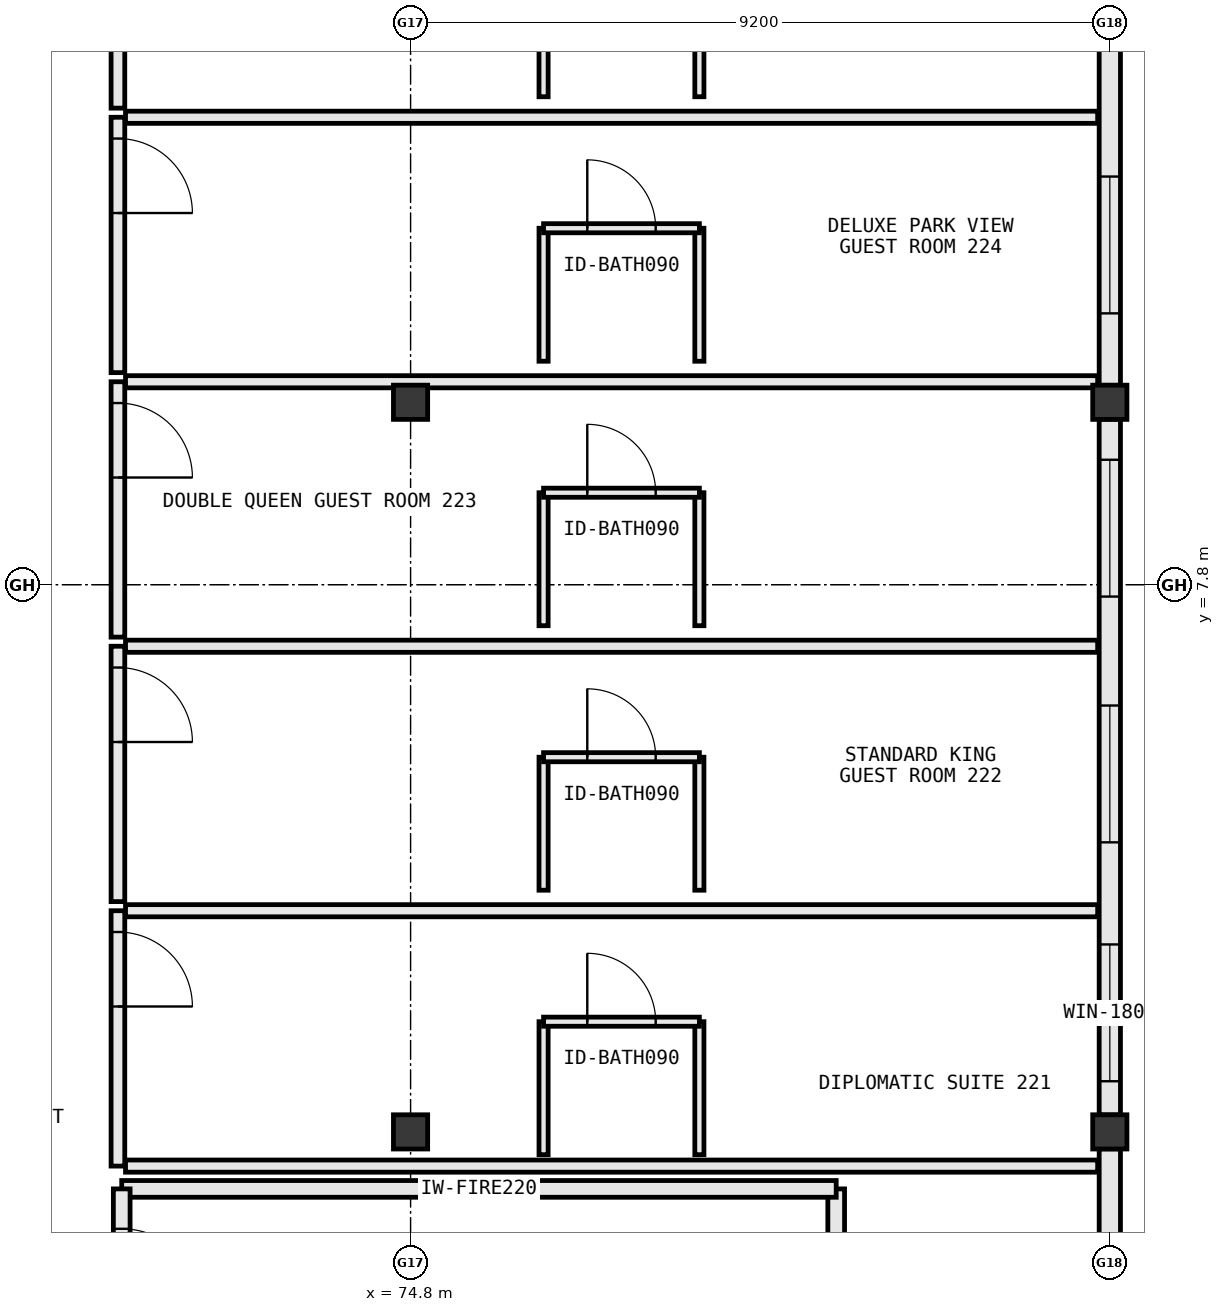
"""IFC4 building model, lengths in metres.
Left out: names, types, materials, properties, quantities, classifications, styles, units other than length and angle.
Written with IfcOpenShell. Run it as: python <this file> out.ifc"""

import sys

from ifc_helpers import new_model, si_unit, direction, frame, frame_2d, origin, origin_2d, place, context, subcontext, project, spatial, rectangle, extrude, element, fill, save


model = new_model("IFC4")
c1 = context("Model", 3, precision=1e-05, world=origin(), true_north=direction((0.0, 1.0)))
c2 = subcontext(c1, "Body", "Model", "MODEL_VIEW")
j1 = project(units=[si_unit("LENGTHUNIT", "METRE"), si_unit("PLANEANGLEUNIT", "RADIAN")], contexts=[c1])
p1 = place(None, origin())
s1 = spatial("IfcSite", under=j1, at=p1, CompositionType="ELEMENT")
p2 = place(p1, origin())
s2 = spatial("IfcBuilding", under=s1, at=p2, CompositionType="ELEMENT")
p3 = place(p2, frame((0.0, 0.0, 31.4)))
s3 = spatial("IfcBuildingStorey", under=s2, at=p3, CompositionType="ELEMENT", Elevation=31.4)
for number, where, z_axis, x_axis in (
    (1, (74.8, 0.6, 0.0), (0.0, 0.0, 1.0), (1.0, 0.0, 0.0)),
    (2, (74.8, 10.2, 0.0), (0.0, 0.0, 1.0), (1.0, 0.0, 0.0)),
    (3, (84.0, 0.6, 0.0), (0.0, 0.0, 1.0), (1.0, 0.0, 0.0)),
    (4, (84.0, 10.2, 0.0), (0.0, 0.0, 1.0), (1.0, 0.0, 0.0)),
):
    element("IfcColumn", number, at=place(p3, frame(where, z_axis=z_axis, x_axis=x_axis)), inside=s3, PredefinedType="COLUMN", context=c2, shape_type="SweptSolid", body=[
        extrude(rectangle(XDim=0.45, YDim=0.45, at=origin_2d()), origin(), (0.0, 0.0, 1.0), 3.8),
    ])
p4 = place(p3, frame((84.0, -8.777, 0.0), z_axis=(0.0, 0.0, 1.0), x_axis=(0.0, 1.0, 0.0)))
e5 = element("IfcWall", 5, at=p4, inside=s3, PredefinedType="STANDARD", context=c2, shape_type="SweptSolid", body=[
    extrude(rectangle(XDim=9.154, YDim=0.28, at=frame_2d((4.577, 0.0))), origin(), (0.0, 0.0, 1.0), 2.97),
])
p5 = place(p4, frame((1.463, 0.0, 0.85)))
e6 = element("IfcOpeningElement", 6, at=p5, cuts=e5, PredefinedType="OPENING", context=c2, shape_type="SweptSolid", body=[
    extrude(rectangle(XDim=1.65, YDim=1.8, at=frame_2d((0.825, 0.9))), frame((0.0, 0.152, 0.0), z_axis=(0.0, -1.0, 0.0), x_axis=(1.0, 0.0, 0.0)), (0.0, 0.0, 1.0), 0.304),
])
p6 = place(p4, frame((6.041, 0.0, 0.85)))
e7 = element("IfcOpeningElement", 7, at=p6, cuts=e5, PredefinedType="OPENING", context=c2, shape_type="SweptSolid", body=[
    extrude(rectangle(XDim=1.65, YDim=1.8, at=frame_2d((0.825, 0.9))), frame((0.0, 0.152, 0.0), z_axis=(0.0, -1.0, 0.0), x_axis=(1.0, 0.0, 0.0)), (0.0, 0.0, 1.0), 0.304),
])
p7 = place(p3, frame((84.0, 0.823, 0.0), z_axis=(0.0, 0.0, 1.0), x_axis=(0.0, 1.0, 0.0)))
e8 = element("IfcWall", 8, at=p7, inside=s3, PredefinedType="STANDARD", context=c2, shape_type="SweptSolid", body=[
    extrude(rectangle(XDim=9.154, YDim=0.28, at=frame_2d((4.577, 0.0))), origin(), (0.0, 0.0, 1.0), 2.97),
])
p8 = place(p7, frame((0.444, 0.0, 0.85)))
e9 = element("IfcOpeningElement", 9, at=p8, cuts=e8, PredefinedType="OPENING", context=c2, shape_type="SweptSolid", body=[
    extrude(rectangle(XDim=1.8, YDim=1.85, at=frame_2d((0.9, 0.925))), frame((0.0, 0.152, 0.0), z_axis=(0.0, -1.0, 0.0), x_axis=(1.0, 0.0, 0.0)), (0.0, 0.0, 1.0), 0.304),
])
p9 = place(p7, frame((3.587, 0.0, 0.85)))
e10 = element("IfcOpeningElement", 10, at=p9, cuts=e8, PredefinedType="OPENING", context=c2, shape_type="SweptSolid", body=[
    extrude(rectangle(XDim=1.8, YDim=1.85, at=frame_2d((0.9, 0.925))), frame((0.0, 0.152, 0.0), z_axis=(0.0, -1.0, 0.0), x_axis=(1.0, 0.0, 0.0)), (0.0, 0.0, 1.0), 0.304),
])
p10 = place(p7, frame((6.821, 0.0, 0.85)))
e11 = element("IfcOpeningElement", 11, at=p10, cuts=e8, PredefinedType="OPENING", context=c2, shape_type="SweptSolid", body=[
    extrude(rectangle(XDim=1.8, YDim=1.85, at=frame_2d((0.9, 0.925))), frame((0.0, 0.152, 0.0), z_axis=(0.0, -1.0, 0.0), x_axis=(1.0, 0.0, 0.0)), (0.0, 0.0, 1.0), 0.304),
])
p11 = place(p3, frame((84.0, 10.423, 0.0), z_axis=(0.0, 0.0, 1.0), x_axis=(0.0, 1.0, 0.0)))
e12 = element("IfcWall", 12, at=p11, inside=s3, PredefinedType="STANDARD", context=c2, shape_type="SweptSolid", body=[
    extrude(rectangle(XDim=7.954, YDim=0.28, at=frame_2d((3.977, 0.0))), origin(), (0.0, 0.0, 1.0), 2.97),
])
p12 = place(p11, frame((0.947, 0.0, 0.85)))
e13 = element("IfcOpeningElement", 13, at=p12, cuts=e12, PredefinedType="OPENING", context=c2, shape_type="SweptSolid", body=[
    extrude(rectangle(XDim=1.8, YDim=1.85, at=frame_2d((0.9, 0.925))), frame((0.0, 0.152, 0.0), z_axis=(0.0, -1.0, 0.0), x_axis=(1.0, 0.0, 0.0)), (0.0, 0.0, 1.0), 0.304),
])
p13 = place(p11, frame((4.427, 0.0, 0.85)))
e14 = element("IfcOpeningElement", 14, at=p13, cuts=e12, PredefinedType="OPENING", context=c2, shape_type="SweptSolid", body=[
    extrude(rectangle(XDim=1.8, YDim=1.85, at=frame_2d((0.9, 0.925))), frame((0.0, 0.152, 0.0), z_axis=(0.0, -1.0, 0.0), x_axis=(1.0, 0.0, 0.0)), (0.0, 0.0, 1.0), 0.304),
])
p14 = place(p3, frame((80.4, -2.25, 0.0), z_axis=(0.0, 0.0, 1.0), x_axis=(0.0, 1.0, 0.0)))
e15 = element("IfcWall", 15, at=p14, inside=s3, PredefinedType="STANDARD", context=c2, shape_type="SweptSolid", body=[
    extrude(rectangle(XDim=2.1, YDim=0.22, at=frame_2d((1.05, 0.0))), origin(), (0.0, 0.0, 1.0), 3.555),
])
p15 = place(p3, frame((80.4, -0.15, 0.0), z_axis=(0.0, 0.0, 1.0), x_axis=(-1.0, 0.0, 0.0)))
e16 = element("IfcWall", 16, at=p15, inside=s3, PredefinedType="STANDARD", context=c2, shape_type="SweptSolid", body=[
    extrude(rectangle(XDim=9.4, YDim=0.22, at=frame_2d((4.7, 0.0))), origin(), (0.0, 0.0, 1.0), 3.555),
])
p16 = place(p3, frame((71.0, -0.15, 0.0), z_axis=(0.0, 0.0, 1.0), x_axis=(0.0, -1.0, 0.0)))
e17 = element("IfcWall", 17, at=p16, inside=s3, PredefinedType="STANDARD", context=c2, shape_type="SweptSolid", body=[
    extrude(rectangle(XDim=2.1, YDim=0.22, at=frame_2d((1.05, 0.0))), origin(), (0.0, 0.0, 1.0), 3.555),
])
p17 = place(p16, frame((0.525, 0.0, 0.0)))
e18 = element("IfcOpeningElement", 18, at=p17, cuts=e17, PredefinedType="OPENING", context=c2, shape_type="SweptSolid", body=[
    extrude(rectangle(XDim=1.05, YDim=2.2, at=frame_2d((0.525, 1.1))), frame((0.0, 0.122, 0.0), z_axis=(0.0, -1.0, 0.0), x_axis=(1.0, 0.0, 0.0)), (0.0, 0.0, 1.0), 0.244),
])
p18 = place(p3, frame((70.95, 3.51, 0.0), z_axis=(0.0, 0.0, 1.0), x_axis=(0.0, -1.0, 0.0)))
e19 = element("IfcWall", 19, at=p18, inside=s3, PredefinedType="PARTITIONING", context=c2, shape_type="SweptSolid", body=[
    extrude(rectangle(XDim=3.36, YDim=0.18, at=frame_2d((1.68, 0.0))), origin(), (0.0, 0.0, 1.0), 3.555),
])
p19 = place(p18, frame((0.28, 0.0, 0.0)))
e20 = element("IfcOpeningElement", 20, at=p19, cuts=e19, PredefinedType="OPENING", context=c2, shape_type="SweptSolid", body=[
    extrude(rectangle(XDim=0.98, YDim=2.18, at=frame_2d((0.49, 1.09))), frame((0.0, 0.102, 0.0), z_axis=(0.0, -1.0, 0.0), x_axis=(1.0, 0.0, 0.0)), (0.0, 0.0, 1.0), 0.204),
])
for number, where, z_axis, x_axis in (
    (21, (71.05, 0.15, 0.0), (0.0, 0.0, 1.0), (1.0, 0.0, 0.0)),
    (22, (71.05, 3.51, 0.0), (0.0, 0.0, 1.0), (1.0, 0.0, 0.0)),
):
    element("IfcWall", number, at=place(p3, frame(where, z_axis=z_axis, x_axis=x_axis)), inside=s3, PredefinedType="PARTITIONING", context=c2, shape_type="SweptSolid", body=[
        extrude(rectangle(XDim=12.79, YDim=0.16, at=frame_2d((6.395, 0.0))), origin(), (0.0, 0.0, 1.0), 3.555),
    ])
for number, where, z_axis, x_axis in (
    (23, (76.55, 0.3, 0.0), (0.0, 0.0, 1.0), (0.0, 1.0, 0.0)),
    (24, (78.6, 0.3, 0.0), (0.0, 0.0, 1.0), (0.0, 1.0, 0.0)),
):
    element("IfcWall", number, at=place(p3, frame(where, z_axis=z_axis, x_axis=x_axis)), inside=s3, PredefinedType="PARTITIONING", context=c2, shape_type="SweptSolid", body=[
        extrude(rectangle(XDim=1.75, YDim=0.12, at=frame_2d((0.875, 0.0))), origin(), (0.0, 0.0, 1.0), 3.555),
    ])
p20 = place(p3, frame((76.55, 2.05, 0.0), z_axis=(0.0, 0.0, 1.0), x_axis=(1.0, 0.0, 0.0)))
e25 = element("IfcWall", 25, at=p20, inside=s3, PredefinedType="PARTITIONING", context=c2, shape_type="SweptSolid", body=[
    extrude(rectangle(XDim=2.05, YDim=0.12, at=frame_2d((1.025, 0.0))), origin(), (0.0, 0.0, 1.0), 3.555),
])
p21 = place(p20, frame((0.575, 0.0, 0.0)))
e26 = element("IfcOpeningElement", 26, at=p21, cuts=e25, PredefinedType="OPENING", context=c2, shape_type="SweptSolid", body=[
    extrude(rectangle(XDim=0.9, YDim=2.15, at=frame_2d((0.45, 1.075))), frame((0.0, 0.072, 0.0), z_axis=(0.0, -1.0, 0.0), x_axis=(1.0, 0.0, 0.0)), (0.0, 0.0, 1.0), 0.144),
])
p22 = place(p3, frame((70.95, 6.99, 0.0), z_axis=(0.0, 0.0, 1.0), x_axis=(0.0, -1.0, 0.0)))
e27 = element("IfcWall", 27, at=p22, inside=s3, PredefinedType="PARTITIONING", context=c2, shape_type="SweptSolid", body=[
    extrude(rectangle(XDim=3.36, YDim=0.18, at=frame_2d((1.68, 0.0))), origin(), (0.0, 0.0, 1.0), 3.555),
])
p23 = place(p22, frame((0.28, 0.0, 0.0)))
e28 = element("IfcOpeningElement", 28, at=p23, cuts=e27, PredefinedType="OPENING", context=c2, shape_type="SweptSolid", body=[
    extrude(rectangle(XDim=0.98, YDim=2.18, at=frame_2d((0.49, 1.09))), frame((0.0, 0.102, 0.0), z_axis=(0.0, -1.0, 0.0), x_axis=(1.0, 0.0, 0.0)), (0.0, 0.0, 1.0), 0.204),
])
p24 = place(p3, frame((71.05, 6.99, 0.0), z_axis=(0.0, 0.0, 1.0), x_axis=(1.0, 0.0, 0.0)))
e29 = element("IfcWall", 29, at=p24, inside=s3, PredefinedType="PARTITIONING", context=c2, shape_type="SweptSolid", body=[
    extrude(rectangle(XDim=12.79, YDim=0.16, at=frame_2d((6.395, 0.0))), origin(), (0.0, 0.0, 1.0), 3.555),
])
for number, where, z_axis, x_axis in (
    (30, (76.55, 3.78, 0.0), (0.0, 0.0, 1.0), (0.0, 1.0, 0.0)),
    (31, (78.6, 3.78, 0.0), (0.0, 0.0, 1.0), (0.0, 1.0, 0.0)),
):
    element("IfcWall", number, at=place(p3, frame(where, z_axis=z_axis, x_axis=x_axis)), inside=s3, PredefinedType="PARTITIONING", context=c2, shape_type="SweptSolid", body=[
        extrude(rectangle(XDim=1.75, YDim=0.12, at=frame_2d((0.875, 0.0))), origin(), (0.0, 0.0, 1.0), 3.555),
    ])
p25 = place(p3, frame((76.55, 5.53, 0.0), z_axis=(0.0, 0.0, 1.0), x_axis=(1.0, 0.0, 0.0)))
e32 = element("IfcWall", 32, at=p25, inside=s3, PredefinedType="PARTITIONING", context=c2, shape_type="SweptSolid", body=[
    extrude(rectangle(XDim=2.05, YDim=0.12, at=frame_2d((1.025, 0.0))), origin(), (0.0, 0.0, 1.0), 3.555),
])
p26 = place(p25, frame((0.575, 0.0, 0.0)))
e33 = element("IfcOpeningElement", 33, at=p26, cuts=e32, PredefinedType="OPENING", context=c2, shape_type="SweptSolid", body=[
    extrude(rectangle(XDim=0.9, YDim=2.15, at=frame_2d((0.45, 1.075))), frame((0.0, 0.072, 0.0), z_axis=(0.0, -1.0, 0.0), x_axis=(1.0, 0.0, 0.0)), (0.0, 0.0, 1.0), 0.144),
])
p27 = place(p3, frame((70.95, 10.47, 0.0), z_axis=(0.0, 0.0, 1.0), x_axis=(0.0, -1.0, 0.0)))
e34 = element("IfcWall", 34, at=p27, inside=s3, PredefinedType="PARTITIONING", context=c2, shape_type="SweptSolid", body=[
    extrude(rectangle(XDim=3.36, YDim=0.18, at=frame_2d((1.68, 0.0))), origin(), (0.0, 0.0, 1.0), 3.555),
])
p28 = place(p27, frame((0.28, 0.0, 0.0)))
e35 = element("IfcOpeningElement", 35, at=p28, cuts=e34, PredefinedType="OPENING", context=c2, shape_type="SweptSolid", body=[
    extrude(rectangle(XDim=0.98, YDim=2.18, at=frame_2d((0.49, 1.09))), frame((0.0, 0.102, 0.0), z_axis=(0.0, -1.0, 0.0), x_axis=(1.0, 0.0, 0.0)), (0.0, 0.0, 1.0), 0.204),
])
p29 = place(p3, frame((71.05, 10.47, 0.0), z_axis=(0.0, 0.0, 1.0), x_axis=(1.0, 0.0, 0.0)))
e36 = element("IfcWall", 36, at=p29, inside=s3, PredefinedType="PARTITIONING", context=c2, shape_type="SweptSolid", body=[
    extrude(rectangle(XDim=12.79, YDim=0.16, at=frame_2d((6.395, 0.0))), origin(), (0.0, 0.0, 1.0), 2.93),
])
for number, where, z_axis, x_axis in (
    (37, (76.55, 7.26, 0.0), (0.0, 0.0, 1.0), (0.0, 1.0, 0.0)),
    (38, (78.6, 7.26, 0.0), (0.0, 0.0, 1.0), (0.0, 1.0, 0.0)),
):
    element("IfcWall", number, at=place(p3, frame(where, z_axis=z_axis, x_axis=x_axis)), inside=s3, PredefinedType="PARTITIONING", context=c2, shape_type="SweptSolid", body=[
        extrude(rectangle(XDim=1.75, YDim=0.12, at=frame_2d((0.875, 0.0))), origin(), (0.0, 0.0, 1.0), 3.555),
    ])
p30 = place(p3, frame((76.55, 9.01, 0.0), z_axis=(0.0, 0.0, 1.0), x_axis=(1.0, 0.0, 0.0)))
e39 = element("IfcWall", 39, at=p30, inside=s3, PredefinedType="PARTITIONING", context=c2, shape_type="SweptSolid", body=[
    extrude(rectangle(XDim=2.05, YDim=0.12, at=frame_2d((1.025, 0.0))), origin(), (0.0, 0.0, 1.0), 3.555),
])
p31 = place(p30, frame((0.575, 0.0, 0.0)))
e40 = element("IfcOpeningElement", 40, at=p31, cuts=e39, PredefinedType="OPENING", context=c2, shape_type="SweptSolid", body=[
    extrude(rectangle(XDim=0.9, YDim=2.15, at=frame_2d((0.45, 1.075))), frame((0.0, 0.072, 0.0), z_axis=(0.0, -1.0, 0.0), x_axis=(1.0, 0.0, 0.0)), (0.0, 0.0, 1.0), 0.144),
])
p32 = place(p3, frame((70.95, 13.95, 0.0), z_axis=(0.0, 0.0, 1.0), x_axis=(0.0, -1.0, 0.0)))
e41 = element("IfcWall", 41, at=p32, inside=s3, PredefinedType="PARTITIONING", context=c2, shape_type="SweptSolid", body=[
    extrude(rectangle(XDim=3.36, YDim=0.18, at=frame_2d((1.68, 0.0))), origin(), (0.0, 0.0, 1.0), 3.555),
])
p33 = place(p32, frame((0.28, 0.0, 0.0)))
e42 = element("IfcOpeningElement", 42, at=p33, cuts=e41, PredefinedType="OPENING", context=c2, shape_type="SweptSolid", body=[
    extrude(rectangle(XDim=0.98, YDim=2.18, at=frame_2d((0.49, 1.09))), frame((0.0, 0.102, 0.0), z_axis=(0.0, -1.0, 0.0), x_axis=(1.0, 0.0, 0.0)), (0.0, 0.0, 1.0), 0.204),
])
p34 = place(p3, frame((71.05, 13.95, 0.0), z_axis=(0.0, 0.0, 1.0), x_axis=(1.0, 0.0, 0.0)))
e43 = element("IfcWall", 43, at=p34, inside=s3, PredefinedType="PARTITIONING", context=c2, shape_type="SweptSolid", body=[
    extrude(rectangle(XDim=12.79, YDim=0.16, at=frame_2d((6.395, 0.0))), origin(), (0.0, 0.0, 1.0), 3.555),
])
for number, where, z_axis, x_axis in (
    (44, (76.55, 10.74, 0.0), (0.0, 0.0, 1.0), (0.0, 1.0, 0.0)),
    (45, (78.6, 10.74, 0.0), (0.0, 0.0, 1.0), (0.0, 1.0, 0.0)),
):
    element("IfcWall", number, at=place(p3, frame(where, z_axis=z_axis, x_axis=x_axis)), inside=s3, PredefinedType="PARTITIONING", context=c2, shape_type="SweptSolid", body=[
        extrude(rectangle(XDim=1.75, YDim=0.12, at=frame_2d((0.875, 0.0))), origin(), (0.0, 0.0, 1.0), 3.555),
    ])
p35 = place(p3, frame((76.55, 12.49, 0.0), z_axis=(0.0, 0.0, 1.0), x_axis=(1.0, 0.0, 0.0)))
e46 = element("IfcWall", 46, at=p35, inside=s3, PredefinedType="PARTITIONING", context=c2, shape_type="SweptSolid", body=[
    extrude(rectangle(XDim=2.05, YDim=0.12, at=frame_2d((1.025, 0.0))), origin(), (0.0, 0.0, 1.0), 3.555),
])
p36 = place(p35, frame((0.575, 0.0, 0.0)))
e47 = element("IfcOpeningElement", 47, at=p36, cuts=e46, PredefinedType="OPENING", context=c2, shape_type="SweptSolid", body=[
    extrude(rectangle(XDim=0.9, YDim=2.15, at=frame_2d((0.45, 1.075))), frame((0.0, 0.072, 0.0), z_axis=(0.0, -1.0, 0.0), x_axis=(1.0, 0.0, 0.0)), (0.0, 0.0, 1.0), 0.144),
])
p37 = place(p3, frame((70.95, 17.43, 0.0), z_axis=(0.0, 0.0, 1.0), x_axis=(0.0, -1.0, 0.0)))
e48 = element("IfcWall", 48, at=p37, inside=s3, PredefinedType="PARTITIONING", context=c2, shape_type="SweptSolid", body=[
    extrude(rectangle(XDim=3.36, YDim=0.18, at=frame_2d((1.68, 0.0))), origin(), (0.0, 0.0, 1.0), 3.555),
])
p38 = place(p37, frame((0.28, 0.0, 0.0)))
e49 = element("IfcOpeningElement", 49, at=p38, cuts=e48, PredefinedType="OPENING", context=c2, shape_type="SweptSolid", body=[
    extrude(rectangle(XDim=0.98, YDim=2.18, at=frame_2d((0.49, 1.09))), frame((0.0, 0.102, 0.0), z_axis=(0.0, -1.0, 0.0), x_axis=(1.0, 0.0, 0.0)), (0.0, 0.0, 1.0), 0.204),
])
for number, where, z_axis, x_axis in (
    (50, (76.55, 14.22, 0.0), (0.0, 0.0, 1.0), (0.0, 1.0, 0.0)),
    (51, (78.6, 14.22, 0.0), (0.0, 0.0, 1.0), (0.0, 1.0, 0.0)),
):
    element("IfcWall", number, at=place(p3, frame(where, z_axis=z_axis, x_axis=x_axis)), inside=s3, PredefinedType="PARTITIONING", context=c2, shape_type="SweptSolid", body=[
        extrude(rectangle(XDim=1.75, YDim=0.12, at=frame_2d((0.875, 0.0))), origin(), (0.0, 0.0, 1.0), 3.555),
    ])
p39 = place(p8, origin())
e52 = element("IfcWindow", 52, at=p39, inside=s3, PartitioningType="SINGLE_PANEL", PredefinedType="WINDOW", context=c2, shape_type="SweptSolid", body=[
    extrude(rectangle(XDim=1.8, YDim=1.85, at=frame_2d((0.9, 0.925))), frame((0.0, 0.03, 0.0), z_axis=(0.0, -1.0, 0.0), x_axis=(1.0, 0.0, 0.0)), (0.0, 0.0, 1.0), 0.06),
])
fill(e9, e52)
p40 = place(p9, origin())
e53 = element("IfcWindow", 53, at=p40, inside=s3, PartitioningType="SINGLE_PANEL", PredefinedType="WINDOW", context=c2, shape_type="SweptSolid", body=[
    extrude(rectangle(XDim=1.8, YDim=1.85, at=frame_2d((0.9, 0.925))), frame((0.0, 0.03, 0.0), z_axis=(0.0, -1.0, 0.0), x_axis=(1.0, 0.0, 0.0)), (0.0, 0.0, 1.0), 0.06),
])
fill(e10, e53)
p41 = place(p10, origin())
e54 = element("IfcWindow", 54, at=p41, inside=s3, PartitioningType="SINGLE_PANEL", PredefinedType="WINDOW", context=c2, shape_type="SweptSolid", body=[
    extrude(rectangle(XDim=1.8, YDim=1.85, at=frame_2d((0.9, 0.925))), frame((0.0, 0.03, 0.0), z_axis=(0.0, -1.0, 0.0), x_axis=(1.0, 0.0, 0.0)), (0.0, 0.0, 1.0), 0.06),
])
fill(e11, e54)
p42 = place(p12, origin())
e55 = element("IfcWindow", 55, at=p42, inside=s3, PartitioningType="SINGLE_PANEL", PredefinedType="WINDOW", context=c2, shape_type="SweptSolid", body=[
    extrude(rectangle(XDim=1.8, YDim=1.85, at=frame_2d((0.9, 0.925))), frame((0.0, 0.03, 0.0), z_axis=(0.0, -1.0, 0.0), x_axis=(1.0, 0.0, 0.0)), (0.0, 0.0, 1.0), 0.06),
])
fill(e13, e55)
p43 = place(p17, origin())
e56 = element("IfcDoor", 56, at=p43, inside=s3, OperationType="SINGLE_SWING_RIGHT", PredefinedType="DOOR", context=c2, shape_type="SweptSolid", body=[
    extrude(rectangle(XDim=1.05, YDim=2.2, at=frame_2d((0.525, 1.1))), frame((0.0, 0.025, 0.0), z_axis=(0.0, -1.0, 0.0), x_axis=(1.0, 0.0, 0.0)), (0.0, 0.0, 1.0), 0.05),
])
fill(e18, e56)
p44 = place(p19, origin())
e57 = element("IfcDoor", 57, at=p44, inside=s3, OperationType="SINGLE_SWING_RIGHT", PredefinedType="DOOR", context=c2, shape_type="SweptSolid", body=[
    extrude(rectangle(XDim=0.98, YDim=2.18, at=frame_2d((0.49, 1.09))), frame((0.0, 0.025, 0.0), z_axis=(0.0, -1.0, 0.0), x_axis=(1.0, 0.0, 0.0)), (0.0, 0.0, 1.0), 0.05),
])
fill(e20, e57)
p45 = place(p21, origin())
e58 = element("IfcDoor", 58, at=p45, inside=s3, OperationType="SINGLE_SWING_LEFT", PredefinedType="DOOR", context=c2, shape_type="SweptSolid", body=[
    extrude(rectangle(XDim=0.9, YDim=2.15, at=frame_2d((0.45, 1.075))), frame((0.0, 0.025, 0.0), z_axis=(0.0, -1.0, 0.0), x_axis=(1.0, 0.0, 0.0)), (0.0, 0.0, 1.0), 0.05),
])
fill(e26, e58)
p46 = place(p23, origin())
e59 = element("IfcDoor", 59, at=p46, inside=s3, OperationType="SINGLE_SWING_RIGHT", PredefinedType="DOOR", context=c2, shape_type="SweptSolid", body=[
    extrude(rectangle(XDim=0.98, YDim=2.18, at=frame_2d((0.49, 1.09))), frame((0.0, 0.025, 0.0), z_axis=(0.0, -1.0, 0.0), x_axis=(1.0, 0.0, 0.0)), (0.0, 0.0, 1.0), 0.05),
])
fill(e28, e59)
p47 = place(p26, origin())
e60 = element("IfcDoor", 60, at=p47, inside=s3, OperationType="SINGLE_SWING_LEFT", PredefinedType="DOOR", context=c2, shape_type="SweptSolid", body=[
    extrude(rectangle(XDim=0.9, YDim=2.15, at=frame_2d((0.45, 1.075))), frame((0.0, 0.025, 0.0), z_axis=(0.0, -1.0, 0.0), x_axis=(1.0, 0.0, 0.0)), (0.0, 0.0, 1.0), 0.05),
])
fill(e33, e60)
p48 = place(p28, origin())
e61 = element("IfcDoor", 61, at=p48, inside=s3, OperationType="SINGLE_SWING_RIGHT", PredefinedType="DOOR", context=c2, shape_type="SweptSolid", body=[
    extrude(rectangle(XDim=0.98, YDim=2.18, at=frame_2d((0.49, 1.09))), frame((0.0, 0.025, 0.0), z_axis=(0.0, -1.0, 0.0), x_axis=(1.0, 0.0, 0.0)), (0.0, 0.0, 1.0), 0.05),
])
fill(e35, e61)
p49 = place(p31, origin())
e62 = element("IfcDoor", 62, at=p49, inside=s3, OperationType="SINGLE_SWING_LEFT", PredefinedType="DOOR", context=c2, shape_type="SweptSolid", body=[
    extrude(rectangle(XDim=0.9, YDim=2.15, at=frame_2d((0.45, 1.075))), frame((0.0, 0.025, 0.0), z_axis=(0.0, -1.0, 0.0), x_axis=(1.0, 0.0, 0.0)), (0.0, 0.0, 1.0), 0.05),
])
fill(e40, e62)
p50 = place(p33, origin())
e63 = element("IfcDoor", 63, at=p50, inside=s3, OperationType="SINGLE_SWING_RIGHT", PredefinedType="DOOR", context=c2, shape_type="SweptSolid", body=[
    extrude(rectangle(XDim=0.98, YDim=2.18, at=frame_2d((0.49, 1.09))), frame((0.0, 0.025, 0.0), z_axis=(0.0, -1.0, 0.0), x_axis=(1.0, 0.0, 0.0)), (0.0, 0.0, 1.0), 0.05),
])
fill(e42, e63)
p51 = place(p36, origin())
e64 = element("IfcDoor", 64, at=p51, inside=s3, OperationType="SINGLE_SWING_LEFT", PredefinedType="DOOR", context=c2, shape_type="SweptSolid", body=[
    extrude(rectangle(XDim=0.9, YDim=2.15, at=frame_2d((0.45, 1.075))), frame((0.0, 0.025, 0.0), z_axis=(0.0, -1.0, 0.0), x_axis=(1.0, 0.0, 0.0)), (0.0, 0.0, 1.0), 0.05),
])
fill(e47, e64)
save(model, sys.argv[1])
